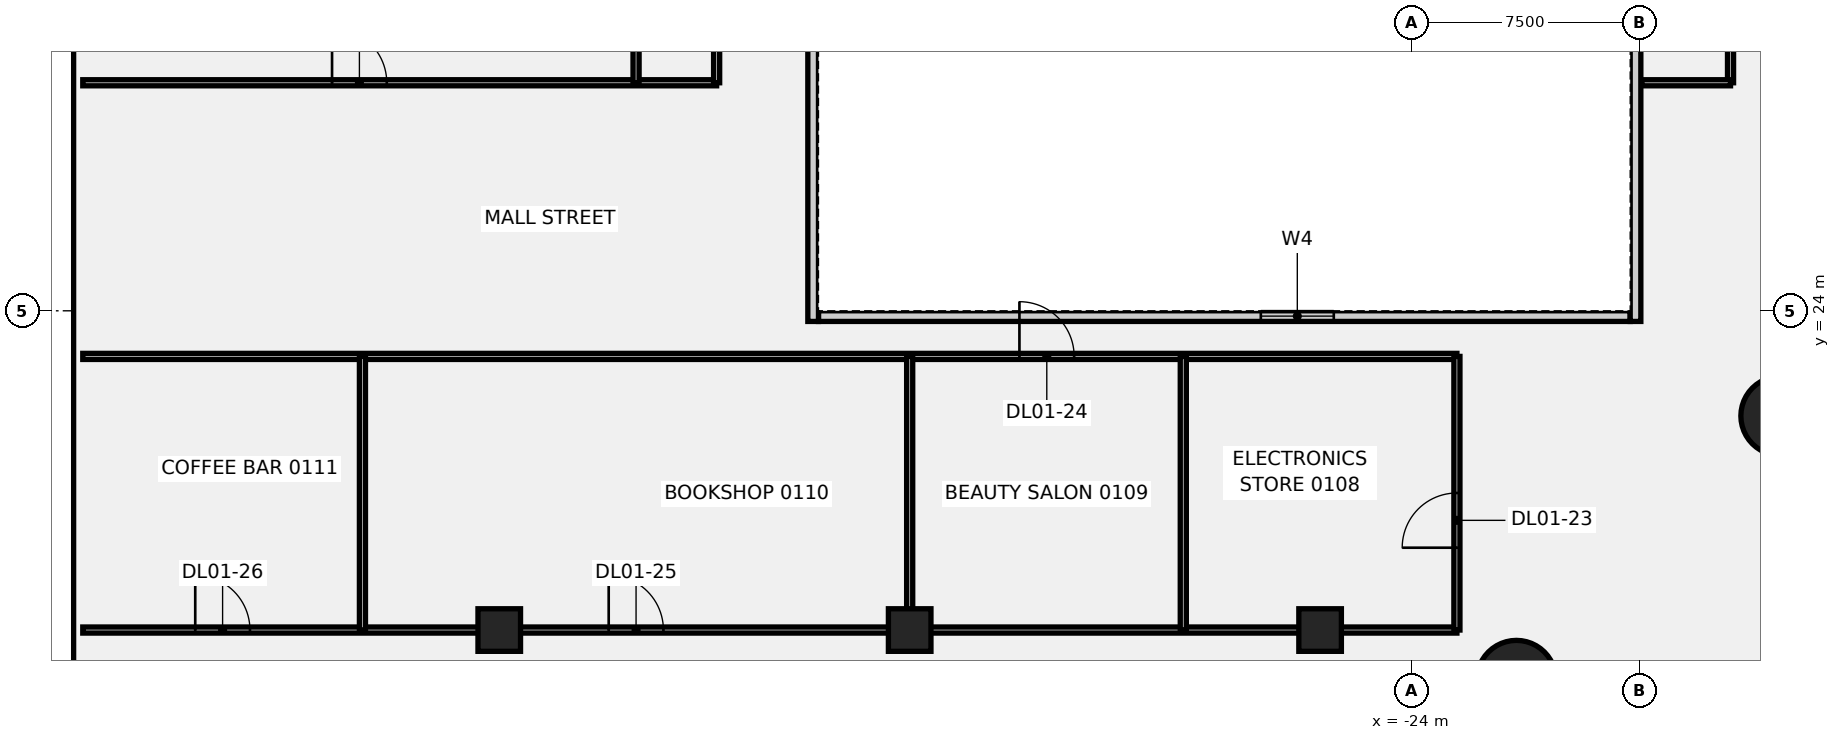
"""IFC4 building model, lengths in metres.
Left out: names, types, materials, properties, quantities, classifications, styles, units other than length and angle.
Written with IfcOpenShell. Run it as: python <this file> out.ifc"""

import sys

from ifc_helpers import new_model, si_unit, direction, frame, frame_2d, origin, origin_2d, place, context, subcontext, project, spatial, rectangle, circle, extrude, element, fill, save


model = new_model("IFC4")
c1 = context("Model", 3, precision=1e-05, world=origin(), true_north=direction((0.0, 1.0)))
c2 = subcontext(c1, "Body", "Model", "MODEL_VIEW")
j1 = project(units=[si_unit("LENGTHUNIT", "METRE"), si_unit("PLANEANGLEUNIT", "RADIAN")], contexts=[c1])
p1 = place(None, origin())
s1 = spatial("IfcSite", under=j1, at=p1, CompositionType="ELEMENT")
p2 = place(p1, origin())
s2 = spatial("IfcBuilding", under=s1, at=p2, CompositionType="ELEMENT")
p3 = place(p2, frame((0.0, 0.0, 9.0)))
s3 = spatial("IfcBuildingStorey", under=s2, at=p3, CompositionType="ELEMENT", Elevation=9.0)
for number, where, z_axis, x_axis in (
    (1, (-11.86, 20.543, -0.5), (0.0, 0.0, 1.0), (1.0, 0.0, 0.0)),
    (2, (-20.543, 11.86, -0.5), (0.0, 0.0, 1.0), (1.0, 0.0, 0.0)),
):
    element("IfcColumn", number, at=place(p3, frame(where, z_axis=z_axis, x_axis=x_axis)), inside=s3, PredefinedType="COLUMN", context=c2, shape_type="SweptSolid", body=[
        extrude(circle(Radius=1.3, at=origin_2d()), origin(), (0.0, 0.0, 1.0), 6.0),
    ])
for number, where, z_axis, x_axis in (
    (3, (-54.0, 13.5, -0.5), (0.0, 0.0, 1.0), (1.0, 0.0, 0.0)),
    (4, (-40.5, 13.5, -0.5), (0.0, 0.0, 1.0), (1.0, 0.0, 0.0)),
    (5, (-27.0, 13.5, -0.5), (0.0, 0.0, 1.0), (1.0, 0.0, 0.0)),
):
    element("IfcColumn", number, at=place(p3, frame(where, z_axis=z_axis, x_axis=x_axis)), inside=s3, PredefinedType="COLUMN", context=c2, shape_type="SweptSolid", body=[
        extrude(rectangle(XDim=1.4, YDim=1.4, at=origin_2d()), origin(), (0.0, 0.0, 1.0), 6.0),
    ])
p4 = place(p3, frame((-67.699, 13.5, 0.0), z_axis=(0.0, 0.0, 1.0), x_axis=(1.0, 0.0, 0.0)))
e6 = element("IfcWall", 6, at=p4, inside=s3, PredefinedType="PARTITIONING", context=c2, shape_type="SweptSolid", body=[
    extrude(rectangle(XDim=45.199, YDim=0.2, at=frame_2d((22.6, 0.0))), origin(), (0.0, 0.0, 1.0), 5.5),
])
p5 = place(p4, frame((17.299, 0.0, 0.0)))
e7 = element("IfcOpeningElement", 7, at=p5, cuts=e6, PredefinedType="OPENING", context=c2, shape_type="SweptSolid", body=[
    extrude(rectangle(XDim=1.8, YDim=2.1, at=frame_2d((0.9, 1.05))), frame((0.0, 0.11, 0.0), z_axis=(0.0, -1.0, 0.0), x_axis=(1.0, 0.0, 0.0)), (0.0, 0.0, 1.0), 0.22),
])
p6 = place(p4, frame((3.699, 0.0, 0.0)))
e8 = element("IfcOpeningElement", 8, at=p6, cuts=e6, PredefinedType="OPENING", context=c2, shape_type="SweptSolid", body=[
    extrude(rectangle(XDim=1.8, YDim=2.1, at=frame_2d((0.9, 1.05))), frame((0.0, 0.11, 0.0), z_axis=(0.0, -1.0, 0.0), x_axis=(1.0, 0.0, 0.0)), (0.0, 0.0, 1.0), 0.22),
])
p7 = place(p3, frame((-67.699, 22.5, 0.0), z_axis=(0.0, 0.0, 1.0), x_axis=(1.0, 0.0, 0.0)))
e9 = element("IfcWall", 9, at=p7, inside=s3, PredefinedType="PARTITIONING", context=c2, shape_type="SweptSolid", body=[
    extrude(rectangle(XDim=45.199, YDim=0.2, at=frame_2d((22.6, 0.0))), origin(), (0.0, 0.0, 1.0), 5.5),
])
p8 = place(p7, frame((30.809, 0.0, 0.0)))
e10 = element("IfcOpeningElement", 10, at=p8, cuts=e9, PredefinedType="OPENING", context=c2, shape_type="SweptSolid", body=[
    extrude(rectangle(XDim=1.8, YDim=2.1, at=frame_2d((0.9, 1.05))), frame((0.0, 0.11, 0.0), z_axis=(0.0, -1.0, 0.0), x_axis=(1.0, 0.0, 0.0)), (0.0, 0.0, 1.0), 0.22),
])
p9 = place(p3, frame((-67.699, 31.5, 0.0), z_axis=(0.0, 0.0, 1.0), x_axis=(1.0, 0.0, 0.0)))
e11 = element("IfcWall", 11, at=p9, inside=s3, PredefinedType="PARTITIONING", context=c2, shape_type="SweptSolid", body=[
    extrude(rectangle(XDim=20.849, YDim=0.2, at=frame_2d((10.424, 0.0))), origin(), (0.0, 0.0, 1.0), 5.5),
])
p10 = place(p9, frame((8.199, 0.0, 0.0)))
e12 = element("IfcOpeningElement", 12, at=p10, cuts=e11, PredefinedType="OPENING", context=c2, shape_type="SweptSolid", body=[
    extrude(rectangle(XDim=1.8, YDim=2.1, at=frame_2d((0.9, 1.05))), frame((0.0, 0.11, 0.0), z_axis=(0.0, -1.0, 0.0), x_axis=(1.0, 0.0, 0.0)), (0.0, 0.0, 1.0), 0.22),
])
p11 = place(p3, frame((-58.5, 13.5, 0.0), z_axis=(0.0, 0.0, 1.0), x_axis=(0.0, 1.0, 0.0)))
e13 = element("IfcWall", 13, at=p11, inside=s3, PredefinedType="PARTITIONING", context=c2, shape_type="SweptSolid", body=[
    extrude(rectangle(XDim=9.0, YDim=0.2, at=frame_2d((4.5, 0.0))), origin(), (0.0, 0.0, 1.0), 5.5),
])
p12 = place(p3, frame((-46.85, 31.5, 0.0), z_axis=(0.0, 0.0, 1.0), x_axis=(0.0, 1.0, 0.0)))
e14 = element("IfcWall", 14, at=p12, inside=s3, PredefinedType="PARTITIONING", context=c2, shape_type="SweptSolid", body=[
    extrude(rectangle(XDim=9.0, YDim=0.2, at=frame_2d((4.5, 0.0))), origin(), (0.0, 0.0, 1.0), 5.5),
])
p13 = place(p12, frame((3.6, 0.0, 0.0)))
e15 = element("IfcOpeningElement", 15, at=p13, cuts=e14, PredefinedType="OPENING", context=c2, shape_type="SweptSolid", body=[
    extrude(rectangle(XDim=1.8, YDim=2.1, at=frame_2d((0.9, 1.05))), frame((0.0, 0.11, 0.0), z_axis=(0.0, -1.0, 0.0), x_axis=(1.0, 0.0, 0.0)), (0.0, 0.0, 1.0), 0.22),
])
for number, where, z_axis, x_axis in (
    (16, (-49.5, 31.5, 0.0), (0.0, 0.0, 1.0), (0.0, 1.0, 0.0)),
    (17, (-40.5, 13.5, 0.0), (0.0, 0.0, 1.0), (0.0, 1.0, 0.0)),
):
    element("IfcWall", number, at=place(p3, frame(where, z_axis=z_axis, x_axis=x_axis)), inside=s3, PredefinedType="PARTITIONING", context=c2, shape_type="SweptSolid", body=[
        extrude(rectangle(XDim=9.0, YDim=0.2, at=frame_2d((4.5, 0.0))), origin(), (0.0, 0.0, 1.0), 5.5),
    ])
p14 = place(p3, frame((-22.5, 13.5, 0.0), z_axis=(0.0, 0.0, 1.0), x_axis=(0.0, 1.0, 0.0)))
e18 = element("IfcWall", 18, at=p14, inside=s3, PredefinedType="PARTITIONING", context=c2, shape_type="SweptSolid", body=[
    extrude(rectangle(XDim=9.0, YDim=0.2, at=frame_2d((4.5, 0.0))), origin(), (0.0, 0.0, 1.0), 5.5),
])
p15 = place(p14, frame((2.708, 0.0, 0.0)))
e19 = element("IfcOpeningElement", 19, at=p15, cuts=e18, PredefinedType="OPENING", context=c2, shape_type="SweptSolid", body=[
    extrude(rectangle(XDim=1.8, YDim=2.1, at=frame_2d((0.9, 1.05))), frame((0.0, 0.11, 0.0), z_axis=(0.0, -1.0, 0.0), x_axis=(1.0, 0.0, 0.0)), (0.0, 0.0, 1.0), 0.22),
])
p16 = place(p3, frame((-31.5, 13.5, 0.0), z_axis=(0.0, 0.0, 1.0), x_axis=(0.0, 1.0, 0.0)))
e20 = element("IfcWall", 20, at=p16, inside=s3, PredefinedType="PARTITIONING", context=c2, shape_type="SweptSolid", body=[
    extrude(rectangle(XDim=9.0, YDim=0.2, at=frame_2d((4.5, 0.0))), origin(), (0.0, 0.0, 1.0), 5.5),
])
p17 = place(p3, frame((-13.5, 31.5, 0.0), z_axis=(0.0, 0.0, 1.0), x_axis=(0.0, 1.0, 0.0)))
e21 = element("IfcWall", 21, at=p17, inside=s3, PredefinedType="PARTITIONING", context=c2, shape_type="SweptSolid", body=[
    extrude(rectangle(XDim=9.0, YDim=0.2, at=frame_2d((4.5, 0.0))), origin(), (0.0, 0.0, 1.0), 5.5),
])
p18 = place(p17, frame((3.61, 0.0, 0.0)))
e22 = element("IfcOpeningElement", 22, at=p18, cuts=e21, PredefinedType="OPENING", context=c2, shape_type="SweptSolid", body=[
    extrude(rectangle(XDim=1.8, YDim=2.1, at=frame_2d((0.9, 1.05))), frame((0.0, 0.11, 0.0), z_axis=(0.0, -1.0, 0.0), x_axis=(1.0, 0.0, 0.0)), (0.0, 0.0, 1.0), 0.22),
])
p19 = place(p3, frame((-16.42, 31.5, 0.0), z_axis=(0.0, 0.0, 1.0), x_axis=(1.0, 0.0, 0.0)))
e23 = element("IfcWall", 23, at=p19, inside=s3, PredefinedType="PARTITIONING", context=c2, shape_type="SweptSolid", body=[
    extrude(rectangle(XDim=2.92, YDim=0.2, at=frame_2d((1.46, 0.0))), origin(), (0.0, 0.0, 1.0), 5.5),
])
p20 = place(p3, frame((-43.5, 23.825, 0.0), z_axis=(0.0, 0.0, 1.0), x_axis=(1.0, 0.0, 0.0)))
e24 = element("IfcWall", 24, at=p20, inside=s3, PredefinedType="SOLIDWALL", context=c2, shape_type="SweptSolid", body=[
    extrude(rectangle(XDim=26.7, YDim=0.35, at=frame_2d((13.35, 0.0))), origin(), (0.0, 0.0, 1.0), 5.5),
])
p21 = place(p20, frame((14.55, 0.0, 1.0)))
e25 = element("IfcOpeningElement", 25, at=p21, cuts=e24, PredefinedType="OPENING", context=c2, shape_type="SweptSolid", body=[
    extrude(rectangle(XDim=2.4, YDim=1.8, at=frame_2d((1.2, 0.9))), frame((0.0, 0.185, 0.0), z_axis=(0.0, -1.0, 0.0), x_axis=(1.0, 0.0, 0.0)), (0.0, 0.0, 1.0), 0.37),
])
p22 = place(p3, frame((-43.675, 23.65, 0.0), z_axis=(0.0, 0.0, 1.0), x_axis=(0.0, 1.0, 0.0)))
e26 = element("IfcWall", 26, at=p22, inside=s3, PredefinedType="SOLIDWALL", context=c2, shape_type="SweptSolid", body=[
    extrude(rectangle(XDim=18.7, YDim=0.35, at=frame_2d((9.35, 0.0))), origin(), (0.0, 0.0, 1.0), 5.5),
])
p23 = place(p22, frame((14.3, 0.0, 1.0)))
e27 = element("IfcOpeningElement", 27, at=p23, cuts=e26, PredefinedType="OPENING", context=c2, shape_type="SweptSolid", body=[
    extrude(rectangle(XDim=2.4, YDim=1.8, at=frame_2d((1.2, 0.9))), frame((0.0, 0.185, 0.0), z_axis=(0.0, -1.0, 0.0), x_axis=(1.0, 0.0, 0.0)), (0.0, 0.0, 1.0), 0.37),
])
p24 = place(p3, frame((-16.625, 23.65, 0.0), z_axis=(0.0, 0.0, 1.0), x_axis=(0.0, 1.0, 0.0)))
e28 = element("IfcWall", 28, at=p24, inside=s3, PredefinedType="SOLIDWALL", context=c2, shape_type="SweptSolid", body=[
    extrude(rectangle(XDim=18.7, YDim=0.35, at=frame_2d((9.35, 0.0))), origin(), (0.0, 0.0, 1.0), 5.5),
])
p25 = place(p24, frame((14.3, 0.0, 1.0)))
e29 = element("IfcOpeningElement", 29, at=p25, cuts=e28, PredefinedType="OPENING", context=c2, shape_type="SweptSolid", body=[
    extrude(rectangle(XDim=2.4, YDim=1.8, at=frame_2d((1.2, 0.9))), frame((0.0, 0.185, 0.0), z_axis=(0.0, -1.0, 0.0), x_axis=(1.0, 0.0, 0.0)), (0.0, 0.0, 1.0), 0.37),
])
p26 = place(p15, origin())
e30 = element("IfcDoor", 30, at=p26, inside=s3, OperationType="SINGLE_SWING_LEFT", PredefinedType="DOOR", context=c2, shape_type="SweptSolid", body=[
    extrude(rectangle(XDim=1.8, YDim=2.1, at=frame_2d((0.9, 1.05))), frame((0.0, 0.025, 0.0), z_axis=(0.0, -1.0, 0.0), x_axis=(1.0, 0.0, 0.0)), (0.0, 0.0, 1.0), 0.05),
])
fill(e19, e30)
p27 = place(p8, origin())
e31 = element("IfcDoor", 31, at=p27, inside=s3, OperationType="SINGLE_SWING_RIGHT", PredefinedType="DOOR", context=c2, shape_type="SweptSolid", body=[
    extrude(rectangle(XDim=1.8, YDim=2.1, at=frame_2d((0.9, 1.05))), frame((0.0, 0.025, 0.0), z_axis=(0.0, -1.0, 0.0), x_axis=(1.0, 0.0, 0.0)), (0.0, 0.0, 1.0), 0.05),
])
fill(e10, e31)
p28 = place(p5, origin())
e32 = element("IfcDoor", 32, at=p28, inside=s3, OperationType="SINGLE_SWING_LEFT", PredefinedType="DOOR", context=c2, shape_type="SweptSolid", body=[
    extrude(rectangle(XDim=1.8, YDim=2.1, at=frame_2d((0.9, 1.05))), frame((0.0, 0.025, 0.0), z_axis=(0.0, -1.0, 0.0), x_axis=(1.0, 0.0, 0.0)), (0.0, 0.0, 1.0), 0.05),
])
fill(e7, e32)
p29 = place(p6, origin())
e33 = element("IfcDoor", 33, at=p29, inside=s3, OperationType="SINGLE_SWING_RIGHT", PredefinedType="DOOR", context=c2, shape_type="SweptSolid", body=[
    extrude(rectangle(XDim=1.8, YDim=2.1, at=frame_2d((0.9, 1.05))), frame((0.0, 0.025, 0.0), z_axis=(0.0, -1.0, 0.0), x_axis=(1.0, 0.0, 0.0)), (0.0, 0.0, 1.0), 0.05),
])
fill(e8, e33)
p30 = place(p10, origin())
e34 = element("IfcDoor", 34, at=p30, inside=s3, OperationType="SINGLE_SWING_RIGHT", PredefinedType="DOOR", context=c2, shape_type="SweptSolid", body=[
    extrude(rectangle(XDim=1.8, YDim=2.1, at=frame_2d((0.9, 1.05))), frame((0.0, 0.025, 0.0), z_axis=(0.0, -1.0, 0.0), x_axis=(1.0, 0.0, 0.0)), (0.0, 0.0, 1.0), 0.05),
])
fill(e12, e34)
p31 = place(p21, origin())
e35 = element("IfcWindow", 35, at=p31, inside=s3, PartitioningType="SINGLE_PANEL", PredefinedType="WINDOW", context=c2, shape_type="SweptSolid", body=[
    extrude(rectangle(XDim=2.4, YDim=1.8, at=frame_2d((1.2, 0.9))), frame((0.0, 0.03, 0.0), z_axis=(0.0, -1.0, 0.0), x_axis=(1.0, 0.0, 0.0)), (0.0, 0.0, 1.0), 0.06),
])
fill(e25, e35)
save(model, sys.argv[1])
